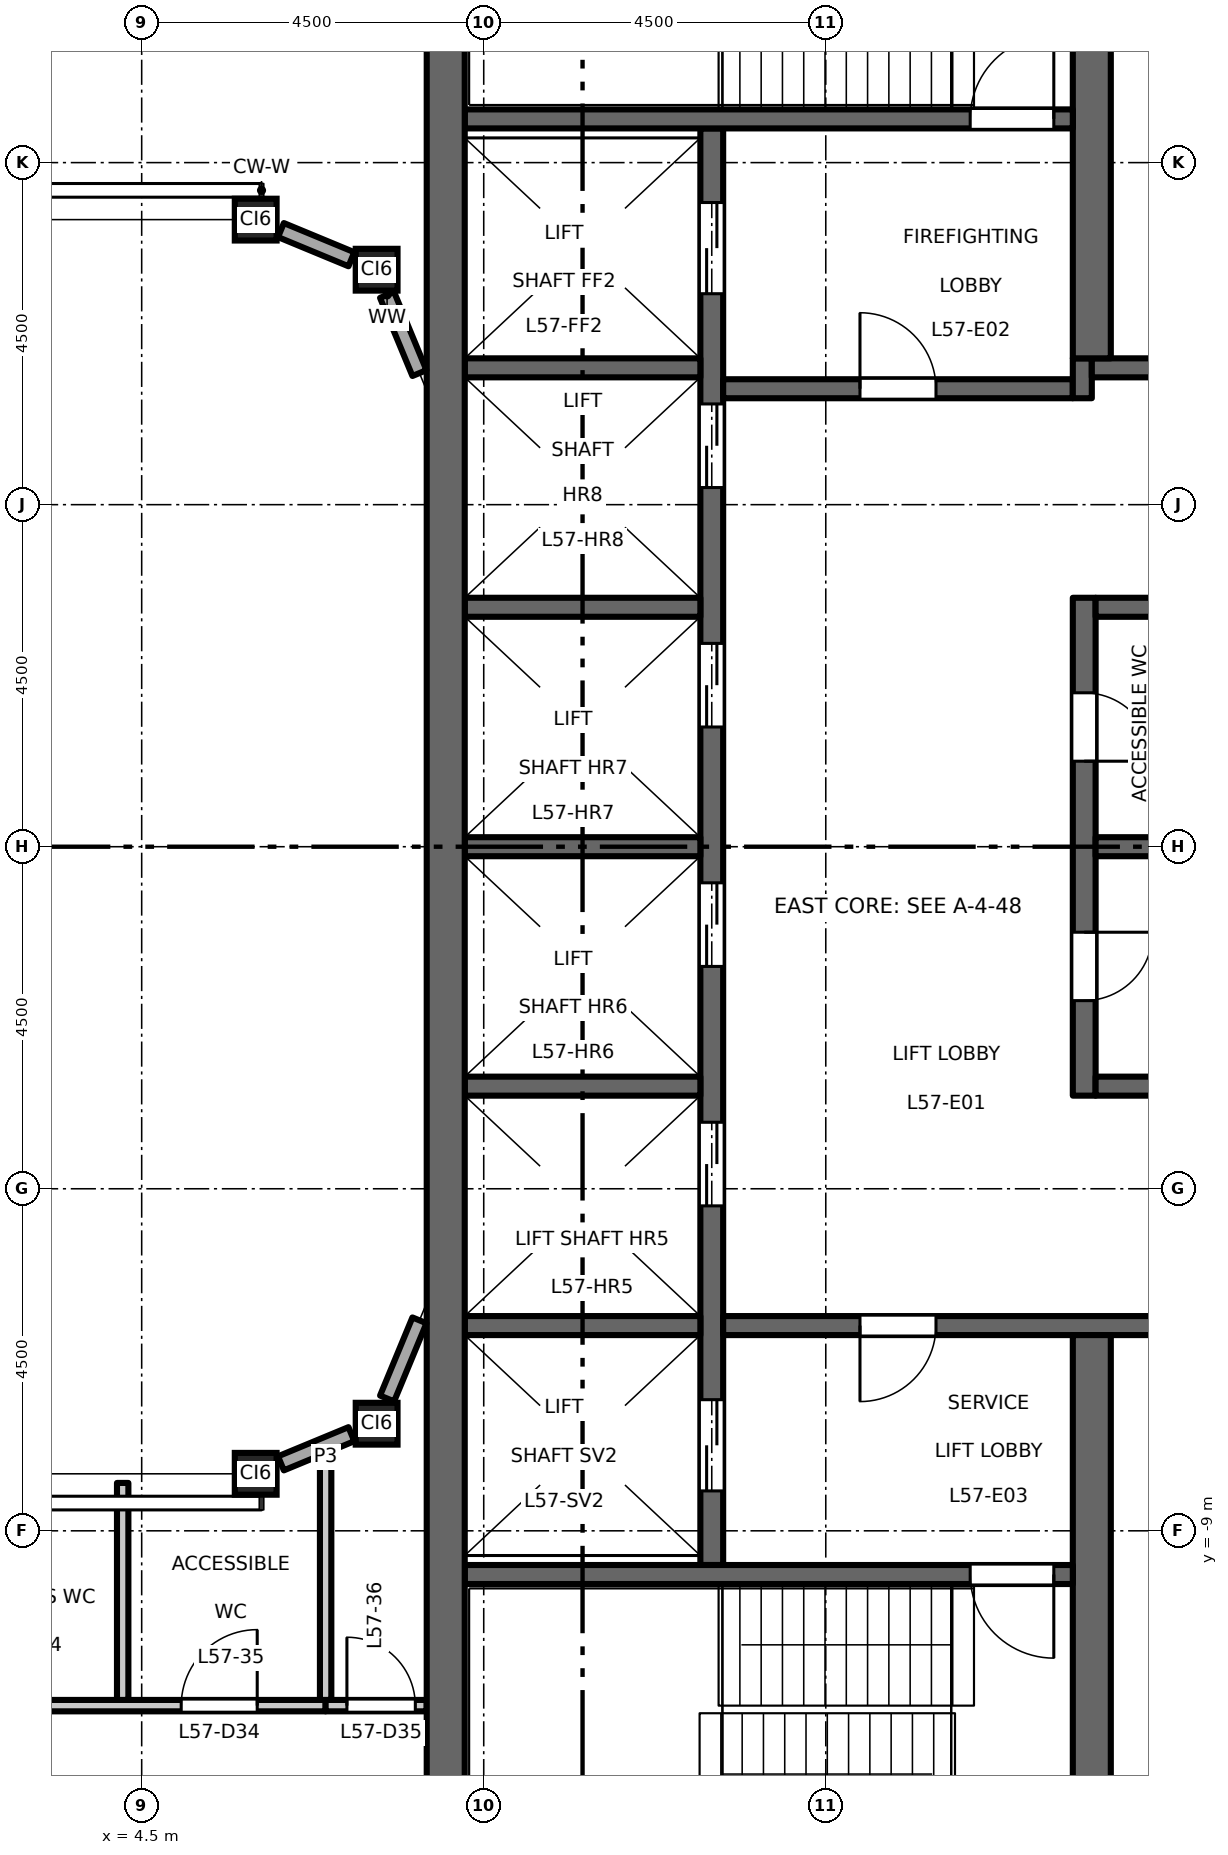
"""IFC4 building model, lengths in metres.
Left out: names, types, materials, properties, quantities, classifications, styles, units other than length and angle.
Written with IfcOpenShell. Run it as: python <this file> out.ifc"""

import sys

from ifc_helpers import new_model, si_unit, direction, frame, frame_2d, origin, origin_2d, place, context, subcontext, project, spatial, rectangle, hollow_rectangle, extrude, element, fill, save


model = new_model("IFC4")
c1 = context("Model", 3, precision=1e-05, world=origin(), true_north=direction((0.0, 1.0)))
c2 = subcontext(c1, "Body", "Model", "MODEL_VIEW")
j1 = project(units=[si_unit("LENGTHUNIT", "METRE"), si_unit("PLANEANGLEUNIT", "RADIAN")], contexts=[c1])
p1 = place(None, origin())
s1 = spatial("IfcSite", under=j1, at=p1, CompositionType="ELEMENT")
p2 = place(p1, origin())
s2 = spatial("IfcBuilding", under=s1, at=p2, CompositionType="ELEMENT")
p3 = place(p2, frame((0.0, 0.0, 264.7)))
s3 = spatial("IfcBuildingStorey", under=s2, at=p3, CompositionType="ELEMENT", Elevation=264.7)
for number, where, z_axis, x_axis in (
    (1, (6.0, -8.25, 0.0), (0.0, 0.0, 1.0), (1.0, 0.0, 0.0)),
    (2, (7.591, -7.591, 0.0), (0.0, 0.0, 1.0), (1.0, 0.0, 0.0)),
    (3, (6.0, 8.25, 0.0), (0.0, 0.0, 1.0), (1.0, 0.0, 0.0)),
    (4, (7.591, 7.591, 0.0), (0.0, 0.0, 1.0), (1.0, 0.0, 0.0)),
):
    element("IfcColumn", number, at=place(p3, frame(where, z_axis=z_axis, x_axis=x_axis)), inside=s3, PredefinedType="COLUMN", context=c2, shape_type="SweptSolid", body=[
        extrude(hollow_rectangle(XDim=0.55, YDim=0.55, WallThickness=0.028, at=origin_2d()), origin(), (0.0, 0.0, 1.0), 4.5),
    ])
p4 = place(p3, frame((12.0, -9.45, 0.0), z_axis=(0.0, 0.0, 1.0), x_axis=(0.0, 1.0, 0.0)))
e5 = element("IfcWall", 5, at=p4, inside=s3, PredefinedType="SHEAR", context=c2, shape_type="SweptSolid", body=[
    extrude(rectangle(XDim=18.9, YDim=0.3, at=frame_2d((9.45, 0.0))), origin(), (0.0, 0.0, 1.0), 4.35),
])
p5 = place(p4, frame((4.725, 0.0, 0.0)))
e6 = element("IfcOpeningElement", 6, at=p5, cuts=e5, PredefinedType="OPENING", context=c2, shape_type="SweptSolid", body=[
    extrude(rectangle(XDim=1.1, YDim=2.1, at=frame_2d((0.55, 1.05))), frame((0.0, 0.16, 0.0), z_axis=(0.0, -1.0, 0.0), x_axis=(1.0, 0.0, 0.0)), (0.0, 0.0, 1.0), 0.32),
])
p6 = place(p4, frame((7.875, 0.0, 0.0)))
e7 = element("IfcOpeningElement", 7, at=p6, cuts=e5, PredefinedType="OPENING", context=c2, shape_type="SweptSolid", body=[
    extrude(rectangle(XDim=1.1, YDim=2.1, at=frame_2d((0.55, 1.05))), frame((0.0, 0.16, 0.0), z_axis=(0.0, -1.0, 0.0), x_axis=(1.0, 0.0, 0.0)), (0.0, 0.0, 1.0), 0.32),
])
p7 = place(p4, frame((11.025, 0.0, 0.0)))
e8 = element("IfcOpeningElement", 8, at=p7, cuts=e5, PredefinedType="OPENING", context=c2, shape_type="SweptSolid", body=[
    extrude(rectangle(XDim=1.1, YDim=2.1, at=frame_2d((0.55, 1.05))), frame((0.0, 0.16, 0.0), z_axis=(0.0, -1.0, 0.0), x_axis=(1.0, 0.0, 0.0)), (0.0, 0.0, 1.0), 0.32),
])
p8 = place(p4, frame((14.175, 0.0, 0.0)))
e9 = element("IfcOpeningElement", 9, at=p8, cuts=e5, PredefinedType="OPENING", context=c2, shape_type="SweptSolid", body=[
    extrude(rectangle(XDim=1.1, YDim=2.1, at=frame_2d((0.55, 1.05))), frame((0.0, 0.16, 0.0), z_axis=(0.0, -1.0, 0.0), x_axis=(1.0, 0.0, 0.0)), (0.0, 0.0, 1.0), 0.32),
])
p9 = place(p4, frame((16.725, 0.0, 0.0)))
e10 = element("IfcOpeningElement", 10, at=p9, cuts=e5, PredefinedType="OPENING", context=c2, shape_type="SweptSolid", body=[
    extrude(rectangle(XDim=1.2, YDim=2.1, at=frame_2d((0.6, 1.05))), frame((0.0, 0.16, 0.0), z_axis=(0.0, -1.0, 0.0), x_axis=(1.0, 0.0, 0.0)), (0.0, 0.0, 1.0), 0.32),
])
p10 = place(p4, frame((0.975, 0.0, 0.0)))
e11 = element("IfcOpeningElement", 11, at=p10, cuts=e5, PredefinedType="OPENING", context=c2, shape_type="SweptSolid", body=[
    extrude(rectangle(XDim=1.2, YDim=2.1, at=frame_2d((0.6, 1.05))), frame((0.0, 0.16, 0.0), z_axis=(0.0, -1.0, 0.0), x_axis=(1.0, 0.0, 0.0)), (0.0, 0.0, 1.0), 0.32),
])
p11 = place(p3, frame((12.15, 6.025, 0.0), z_axis=(0.0, 0.0, 1.0), x_axis=(1.0, 0.0, 0.0)))
e12 = element("IfcWall", 12, at=p11, inside=s3, PredefinedType="SHEAR", context=c2, shape_type="SweptSolid", body=[
    extrude(rectangle(XDim=4.6, YDim=0.25, at=frame_2d((2.3, 0.0))), origin(), (0.0, 0.0, 1.0), 4.35),
])
p12 = place(p11, frame((1.8, 0.0, 0.0)))
e13 = element("IfcOpeningElement", 13, at=p12, cuts=e12, PredefinedType="OPENING", context=c2, shape_type="SweptSolid", body=[
    extrude(rectangle(XDim=1.0, YDim=2.1, at=frame_2d((0.5, 1.05))), frame((0.0, 0.135, 0.0), z_axis=(0.0, -1.0, 0.0), x_axis=(1.0, 0.0, 0.0)), (0.0, 0.0, 1.0), 0.27),
])
p13 = place(p3, frame((16.875, 5.9, 0.0), z_axis=(0.0, 0.0, 1.0), x_axis=(0.0, 1.0, 0.0)))
e14 = element("IfcWall", 14, at=p13, inside=s3, PredefinedType="SHEAR", context=c2, shape_type="SweptSolid", body=[
    extrude(rectangle(XDim=0.525, YDim=0.25, at=frame_2d((0.263, 0.0))), origin(), (0.0, 0.0, 1.0), 4.35),
])
p14 = place(p3, frame((17.0, 6.3, 0.0), z_axis=(0.0, 0.0, 1.0), x_axis=(1.0, 0.0, 0.0)))
e15 = element("IfcWall", 15, at=p14, inside=s3, PredefinedType="SHEAR", context=c2, shape_type="SweptSolid", body=[
    extrude(rectangle(XDim=4.25, YDim=0.25, at=frame_2d((2.125, 0.0))), origin(), (0.0, 0.0, 1.0), 4.35),
])
p15 = place(p3, frame((12.15, -6.3, 0.0), z_axis=(0.0, 0.0, 1.0), x_axis=(1.0, 0.0, 0.0)))
e16 = element("IfcWall", 16, at=p15, inside=s3, PredefinedType="SHEAR", context=c2, shape_type="SweptSolid", body=[
    extrude(rectangle(XDim=9.1, YDim=0.25, at=frame_2d((4.55, 0.0))), origin(), (0.0, 0.0, 1.0), 4.35),
])
p16 = place(p15, frame((1.8, 0.0, 0.0)))
e17 = element("IfcOpeningElement", 17, at=p16, cuts=e16, PredefinedType="OPENING", context=c2, shape_type="SweptSolid", body=[
    extrude(rectangle(XDim=1.0, YDim=2.1, at=frame_2d((0.5, 1.05))), frame((0.0, 0.135, 0.0), z_axis=(0.0, -1.0, 0.0), x_axis=(1.0, 0.0, 0.0)), (0.0, 0.0, 1.0), 0.27),
])
p17 = place(p3, frame((16.9, -3.275, 0.0), z_axis=(0.0, 0.0, 1.0), x_axis=(0.0, 1.0, 0.0)))
e18 = element("IfcWall", 18, at=p17, inside=s3, PredefinedType="SHEAR", context=c2, shape_type="SweptSolid", body=[
    extrude(rectangle(XDim=6.55, YDim=0.3, at=frame_2d((3.275, 0.0))), origin(), (0.0, 0.0, 1.0), 4.35),
])
p18 = place(p17, frame((1.25, 0.0, 0.0)))
e19 = element("IfcOpeningElement", 19, at=p18, cuts=e18, PredefinedType="OPENING", context=c2, shape_type="SweptSolid", body=[
    extrude(rectangle(XDim=0.9, YDim=2.1, at=frame_2d((0.45, 1.05))), frame((0.0, 0.16, 0.0), z_axis=(0.0, -1.0, 0.0), x_axis=(1.0, 0.0, 0.0)), (0.0, 0.0, 1.0), 0.32),
])
p19 = place(p17, frame((4.4, 0.0, 0.0)))
e20 = element("IfcOpeningElement", 20, at=p19, cuts=e18, PredefinedType="OPENING", context=c2, shape_type="SweptSolid", body=[
    extrude(rectangle(XDim=0.9, YDim=2.1, at=frame_2d((0.45, 1.05))), frame((0.0, 0.16, 0.0), z_axis=(0.0, -1.0, 0.0), x_axis=(1.0, 0.0, 0.0)), (0.0, 0.0, 1.0), 0.32),
])
for number, where, z_axis, x_axis in (
    (21, (17.05, 0.0, 0.0), (0.0, 0.0, 1.0), (1.0, 0.0, 0.0)),
    (22, (17.05, 3.15, 0.0), (0.0, 0.0, 1.0), (1.0, 0.0, 0.0)),
    (23, (17.05, -3.15, 0.0), (0.0, 0.0, 1.0), (1.0, 0.0, 0.0)),
):
    element("IfcWall", number, at=place(p3, frame(where, z_axis=z_axis, x_axis=x_axis)), inside=s3, PredefinedType="SHEAR", context=c2, shape_type="SweptSolid", body=[
        extrude(rectangle(XDim=4.2, YDim=0.25, at=frame_2d((2.1, 0.0))), origin(), (0.0, 0.0, 1.0), 4.35),
    ])
for number, where, z_axis, x_axis in (
    (24, (17.0, 6.425, 0.0), (0.0, 0.0, 1.0), (0.0, 1.0, 0.0)),
    (25, (17.0, -13.0, 0.0), (0.0, 0.0, 1.0), (0.0, 1.0, 0.0)),
):
    element("IfcWall", number, at=place(p3, frame(where, z_axis=z_axis, x_axis=x_axis)), inside=s3, PredefinedType="SHEAR", context=c2, shape_type="SweptSolid", body=[
        extrude(rectangle(XDim=6.575, YDim=0.5, at=frame_2d((3.288, 0.0))), origin(), (0.0, 0.0, 1.0), 4.35),
    ])
for number, where, z_axis, x_axis in (
    (26, (8.75, 0.0, 0.0), (0.0, 0.0, 1.0), (1.0, 0.0, 0.0)),
    (27, (8.75, 3.15, 0.0), (0.0, 0.0, 1.0), (1.0, 0.0, 0.0)),
    (28, (8.75, 6.3, 0.0), (0.0, 0.0, 1.0), (1.0, 0.0, 0.0)),
    (29, (8.75, -3.15, 0.0), (0.0, 0.0, 1.0), (1.0, 0.0, 0.0)),
    (30, (8.75, -6.3, 0.0), (0.0, 0.0, 1.0), (1.0, 0.0, 0.0)),
):
    element("IfcWall", number, at=place(p3, frame(where, z_axis=z_axis, x_axis=x_axis)), inside=s3, PredefinedType="SHEAR", context=c2, shape_type="SweptSolid", body=[
        extrude(rectangle(XDim=3.1, YDim=0.25, at=frame_2d((1.55, 0.0))), origin(), (0.0, 0.0, 1.0), 4.35),
    ])
p20 = place(p3, frame((8.75, 9.575, 0.0), z_axis=(0.0, 0.0, 1.0), x_axis=(1.0, 0.0, 0.0)))
e31 = element("IfcWall", 31, at=p20, inside=s3, PredefinedType="SHEAR", context=c2, shape_type="SweptSolid", body=[
    extrude(rectangle(XDim=8.0, YDim=0.25, at=frame_2d((4.0, 0.0))), origin(), (0.0, 0.0, 1.0), 4.35),
])
p21 = place(p20, frame((6.65, 0.0, 0.0)))
e32 = element("IfcOpeningElement", 32, at=p21, cuts=e31, PredefinedType="OPENING", context=c2, shape_type="SweptSolid", body=[
    extrude(rectangle(XDim=1.1, YDim=2.1, at=frame_2d((0.55, 1.05))), frame((0.0, 0.135, 0.0), z_axis=(0.0, -1.0, 0.0), x_axis=(1.0, 0.0, 0.0)), (0.0, 0.0, 1.0), 0.27),
])
p22 = place(p3, frame((8.75, -9.575, 0.0), z_axis=(0.0, 0.0, 1.0), x_axis=(1.0, 0.0, 0.0)))
e33 = element("IfcWall", 33, at=p22, inside=s3, PredefinedType="SHEAR", context=c2, shape_type="SweptSolid", body=[
    extrude(rectangle(XDim=8.0, YDim=0.25, at=frame_2d((4.0, 0.0))), origin(), (0.0, 0.0, 1.0), 4.35),
])
p23 = place(p22, frame((6.65, 0.0, 0.0)))
e34 = element("IfcOpeningElement", 34, at=p23, cuts=e33, PredefinedType="OPENING", context=c2, shape_type="SweptSolid", body=[
    extrude(rectangle(XDim=1.1, YDim=2.1, at=frame_2d((0.55, 1.05))), frame((0.0, 0.135, 0.0), z_axis=(0.0, -1.0, 0.0), x_axis=(1.0, 0.0, 0.0)), (0.0, 0.0, 1.0), 0.27),
])
p24 = place(p3, frame((8.5, -13.0, 0.0), z_axis=(0.0, 0.0, 1.0), x_axis=(0.0, 1.0, 0.0)))
e35 = element("IfcWall", 35, at=p24, inside=s3, PredefinedType="SHEAR", context=c2, shape_type="SweptSolid", body=[
    extrude(rectangle(XDim=26.0, YDim=0.5, at=frame_2d((13.0, 0.0))), origin(), (0.0, 0.0, 1.0), 4.35),
])
p25 = place(p3, frame((6.332, -8.113, 0.0), z_axis=(0.0, 0.0, 1.0), x_axis=(0.923859650767, 0.382731427616, 0.0)))
e36 = element("IfcWall", 36, at=p25, inside=s3, PredefinedType="STANDARD", context=c2, shape_type="SweptSolid", body=[
    extrude(rectangle(XDim=1.003, YDim=0.2, at=frame_2d((0.502, 0.0))), origin(), (0.0, 0.0, 1.0), 3.918),
])
for number, where, z_axis, x_axis in (
    (37, (7.729, -7.259, 0.0), (0.0, 0.0, 1.0), (0.383, 0.924, 0.0)),
    (38, (8.154, 6.231, 0.0), (0.0, 0.0, 1.0), (-0.383, 0.924, 0.0)),
):
    element("IfcWall", number, at=place(p3, frame(where, z_axis=z_axis, x_axis=x_axis)), inside=s3, PredefinedType="STANDARD", context=c2, shape_type="SweptSolid", body=[
        extrude(rectangle(XDim=1.113, YDim=0.2, at=frame_2d((0.556, 0.0))), origin(), (0.0, 0.0, 1.0), 3.918),
    ])
p26 = place(p3, frame((7.259, 7.729, 0.0), z_axis=(0.0, 0.0, 1.0), x_axis=(-0.923859650767, 0.382731427616, 0.0)))
e39 = element("IfcWall", 39, at=p26, inside=s3, PredefinedType="STANDARD", context=c2, shape_type="SweptSolid", body=[
    extrude(rectangle(XDim=1.003, YDim=0.2, at=frame_2d((0.502, 0.0))), origin(), (0.0, 0.0, 1.0), 3.918),
])
p27 = place(p3, frame((-8.25, -11.3, 0.0), z_axis=(0.0, 0.0, 1.0), x_axis=(1.0, 0.0, 0.0)))
e40 = element("IfcWall", 40, at=p27, inside=s3, PredefinedType="PARTITIONING", context=c2, shape_type="SweptSolid", body=[
    extrude(rectangle(XDim=15.17, YDim=0.15, at=frame_2d((7.585, 0.0))), origin(), (0.0, 0.0, 1.0), 4.35),
])
p28 = place(p27, frame((2.6, 0.0, 0.0)))
e41 = element("IfcOpeningElement", 41, at=p28, cuts=e40, PredefinedType="OPENING", context=c2, shape_type="SweptSolid", body=[
    extrude(rectangle(XDim=1.0, YDim=2.1, at=frame_2d((0.5, 1.05))), frame((0.0, 0.085, 0.0), z_axis=(0.0, -1.0, 0.0), x_axis=(1.0, 0.0, 0.0)), (0.0, 0.0, 1.0), 0.17),
])
p29 = place(p27, frame((8.85, 0.0, 0.0)))
e42 = element("IfcOpeningElement", 42, at=p29, cuts=e40, PredefinedType="OPENING", context=c2, shape_type="SweptSolid", body=[
    extrude(rectangle(XDim=1.0, YDim=2.1, at=frame_2d((0.5, 1.05))), frame((0.0, 0.085, 0.0), z_axis=(0.0, -1.0, 0.0), x_axis=(1.0, 0.0, 0.0)), (0.0, 0.0, 1.0), 0.17),
])
p30 = place(p27, frame((13.27, 0.0, 0.0)))
e43 = element("IfcOpeningElement", 43, at=p30, cuts=e40, PredefinedType="OPENING", context=c2, shape_type="SweptSolid", body=[
    extrude(rectangle(XDim=1.0, YDim=2.1, at=frame_2d((0.5, 1.05))), frame((0.0, 0.085, 0.0), z_axis=(0.0, -1.0, 0.0), x_axis=(1.0, 0.0, 0.0)), (0.0, 0.0, 1.0), 0.17),
])
p31 = place(p3, frame((6.92, -11.3, 0.0), z_axis=(0.0, 0.0, 1.0), x_axis=(1.0, 0.0, 0.0)))
e44 = element("IfcWall", 44, at=p31, inside=s3, PredefinedType="PARTITIONING", context=c2, shape_type="SweptSolid", body=[
    extrude(rectangle(XDim=1.33, YDim=0.15, at=frame_2d((0.665, 0.0))), origin(), (0.0, 0.0, 1.0), 4.35),
])
p32 = place(p31, frame((0.28, 0.0, 0.0)))
e45 = element("IfcOpeningElement", 45, at=p32, cuts=e44, PredefinedType="OPENING", context=c2, shape_type="SweptSolid", body=[
    extrude(rectangle(XDim=0.9, YDim=2.1, at=frame_2d((0.45, 1.05))), frame((0.0, 0.085, 0.0), z_axis=(0.0, -1.0, 0.0), x_axis=(1.0, 0.0, 0.0)), (0.0, 0.0, 1.0), 0.17),
])
p33 = place(p3, frame((4.25, -11.225, 0.0), z_axis=(0.0, 0.0, 1.0), x_axis=(0.0, 1.0, 0.0)))
e46 = element("IfcWall", 46, at=p33, inside=s3, PredefinedType="PARTITIONING", context=c2, shape_type="SweptSolid", body=[
    extrude(rectangle(XDim=2.855, YDim=0.15, at=frame_2d((1.427, 0.0))), origin(), (0.0, 0.0, 1.0), 4.35),
])
p34 = place(p3, frame((6.92, -11.225, 0.0), z_axis=(0.0, 0.0, 1.0), x_axis=(0.0, 1.0, 0.0)))
e47 = element("IfcWall", 47, at=p34, inside=s3, PredefinedType="PARTITIONING", context=c2, shape_type="SweptSolid", body=[
    extrude(rectangle(XDim=3.196, YDim=0.15, at=frame_2d((1.598, 0.0))), origin(), (0.0, 0.0, 1.0), 4.35),
])
p35 = place(p12, origin())
e48 = element("IfcDoor", 48, at=p35, inside=s3, OperationType="SINGLE_SWING_RIGHT", PredefinedType="DOOR", context=c2, shape_type="SweptSolid", body=[
    extrude(rectangle(XDim=1.0, YDim=2.1, at=frame_2d((0.5, 1.05))), frame((0.0, 0.025, 0.0), z_axis=(0.0, -1.0, 0.0), x_axis=(1.0, 0.0, 0.0)), (0.0, 0.0, 1.0), 0.05),
])
fill(e13, e48)
p36 = place(p16, origin())
e49 = element("IfcDoor", 49, at=p36, inside=s3, OperationType="SINGLE_SWING_LEFT", PredefinedType="DOOR", context=c2, shape_type="SweptSolid", body=[
    extrude(rectangle(XDim=1.0, YDim=2.1, at=frame_2d((0.5, 1.05))), frame((0.0, 0.025, 0.0), z_axis=(0.0, -1.0, 0.0), x_axis=(1.0, 0.0, 0.0)), (0.0, 0.0, 1.0), 0.05),
])
fill(e17, e49)
p37 = place(p21, origin())
e50 = element("IfcDoor", 50, at=p37, inside=s3, OperationType="SINGLE_SWING_LEFT", PredefinedType="DOOR", context=c2, shape_type="SweptSolid", body=[
    extrude(rectangle(XDim=1.1, YDim=2.1, at=frame_2d((0.55, 1.05))), frame((0.0, 0.025, 0.0), z_axis=(0.0, -1.0, 0.0), x_axis=(1.0, 0.0, 0.0)), (0.0, 0.0, 1.0), 0.05),
])
fill(e32, e50)
p38 = place(p23, origin())
e51 = element("IfcDoor", 51, at=p38, inside=s3, OperationType="SINGLE_SWING_RIGHT", PredefinedType="DOOR", context=c2, shape_type="SweptSolid", body=[
    extrude(rectangle(XDim=1.1, YDim=2.1, at=frame_2d((0.55, 1.05))), frame((0.0, 0.025, 0.0), z_axis=(0.0, -1.0, 0.0), x_axis=(1.0, 0.0, 0.0)), (0.0, 0.0, 1.0), 0.05),
])
fill(e34, e51)
p39 = place(p5, origin())
e52 = element("IfcDoor", 52, at=p39, inside=s3, OperationType="DOUBLE_DOOR_SLIDING", PredefinedType="DOOR", context=c2, shape_type="SweptSolid", body=[
    extrude(rectangle(XDim=1.1, YDim=2.1, at=frame_2d((0.55, 1.05))), frame((0.0, 0.025, 0.0), z_axis=(0.0, -1.0, 0.0), x_axis=(1.0, 0.0, 0.0)), (0.0, 0.0, 1.0), 0.05),
])
fill(e6, e52)
p40 = place(p6, origin())
e53 = element("IfcDoor", 53, at=p40, inside=s3, OperationType="DOUBLE_DOOR_SLIDING", PredefinedType="DOOR", context=c2, shape_type="SweptSolid", body=[
    extrude(rectangle(XDim=1.1, YDim=2.1, at=frame_2d((0.55, 1.05))), frame((0.0, 0.025, 0.0), z_axis=(0.0, -1.0, 0.0), x_axis=(1.0, 0.0, 0.0)), (0.0, 0.0, 1.0), 0.05),
])
fill(e7, e53)
p41 = place(p7, origin())
e54 = element("IfcDoor", 54, at=p41, inside=s3, OperationType="DOUBLE_DOOR_SLIDING", PredefinedType="DOOR", context=c2, shape_type="SweptSolid", body=[
    extrude(rectangle(XDim=1.1, YDim=2.1, at=frame_2d((0.55, 1.05))), frame((0.0, 0.025, 0.0), z_axis=(0.0, -1.0, 0.0), x_axis=(1.0, 0.0, 0.0)), (0.0, 0.0, 1.0), 0.05),
])
fill(e8, e54)
p42 = place(p8, origin())
e55 = element("IfcDoor", 55, at=p42, inside=s3, OperationType="DOUBLE_DOOR_SLIDING", PredefinedType="DOOR", context=c2, shape_type="SweptSolid", body=[
    extrude(rectangle(XDim=1.1, YDim=2.1, at=frame_2d((0.55, 1.05))), frame((0.0, 0.025, 0.0), z_axis=(0.0, -1.0, 0.0), x_axis=(1.0, 0.0, 0.0)), (0.0, 0.0, 1.0), 0.05),
])
fill(e9, e55)
p43 = place(p9, origin())
e56 = element("IfcDoor", 56, at=p43, inside=s3, OperationType="DOUBLE_DOOR_SLIDING", PredefinedType="DOOR", context=c2, shape_type="SweptSolid", body=[
    extrude(rectangle(XDim=1.2, YDim=2.1, at=frame_2d((0.6, 1.05))), frame((0.0, 0.025, 0.0), z_axis=(0.0, -1.0, 0.0), x_axis=(1.0, 0.0, 0.0)), (0.0, 0.0, 1.0), 0.05),
])
fill(e10, e56)
p44 = place(p10, origin())
e57 = element("IfcDoor", 57, at=p44, inside=s3, OperationType="DOUBLE_DOOR_SLIDING", PredefinedType="DOOR", context=c2, shape_type="SweptSolid", body=[
    extrude(rectangle(XDim=1.2, YDim=2.1, at=frame_2d((0.6, 1.05))), frame((0.0, 0.025, 0.0), z_axis=(0.0, -1.0, 0.0), x_axis=(1.0, 0.0, 0.0)), (0.0, 0.0, 1.0), 0.05),
])
fill(e11, e57)
p45 = place(p18, origin())
e58 = element("IfcDoor", 58, at=p45, inside=s3, OperationType="SINGLE_SWING_RIGHT", PredefinedType="DOOR", context=c2, shape_type="SweptSolid", body=[
    extrude(rectangle(XDim=0.9, YDim=2.1, at=frame_2d((0.45, 1.05))), frame((0.0, 0.025, 0.0), z_axis=(0.0, -1.0, 0.0), x_axis=(1.0, 0.0, 0.0)), (0.0, 0.0, 1.0), 0.05),
])
fill(e19, e58)
p46 = place(p19, origin())
e59 = element("IfcDoor", 59, at=p46, inside=s3, OperationType="SINGLE_SWING_LEFT", PredefinedType="DOOR", context=c2, shape_type="SweptSolid", body=[
    extrude(rectangle(XDim=0.9, YDim=2.1, at=frame_2d((0.45, 1.05))), frame((0.0, 0.025, 0.0), z_axis=(0.0, -1.0, 0.0), x_axis=(1.0, 0.0, 0.0)), (0.0, 0.0, 1.0), 0.05),
])
fill(e20, e59)
p47 = place(p30, origin())
e60 = element("IfcDoor", 60, at=p47, inside=s3, OperationType="SINGLE_SWING_RIGHT", PredefinedType="DOOR", context=c2, shape_type="SweptSolid", body=[
    extrude(rectangle(XDim=1.0, YDim=2.1, at=frame_2d((0.5, 1.05))), frame((0.0, 0.025, 0.0), z_axis=(0.0, -1.0, 0.0), x_axis=(1.0, 0.0, 0.0)), (0.0, 0.0, 1.0), 0.05),
])
fill(e43, e60)
p48 = place(p32, origin())
e61 = element("IfcDoor", 61, at=p48, inside=s3, OperationType="SINGLE_SWING_LEFT", PredefinedType="DOOR", context=c2, shape_type="SweptSolid", body=[
    extrude(rectangle(XDim=0.9, YDim=2.1, at=frame_2d((0.45, 1.05))), frame((0.0, 0.025, 0.0), z_axis=(0.0, -1.0, 0.0), x_axis=(1.0, 0.0, 0.0)), (0.0, 0.0, 1.0), 0.05),
])
fill(e45, e61)
save(model, sys.argv[1])
